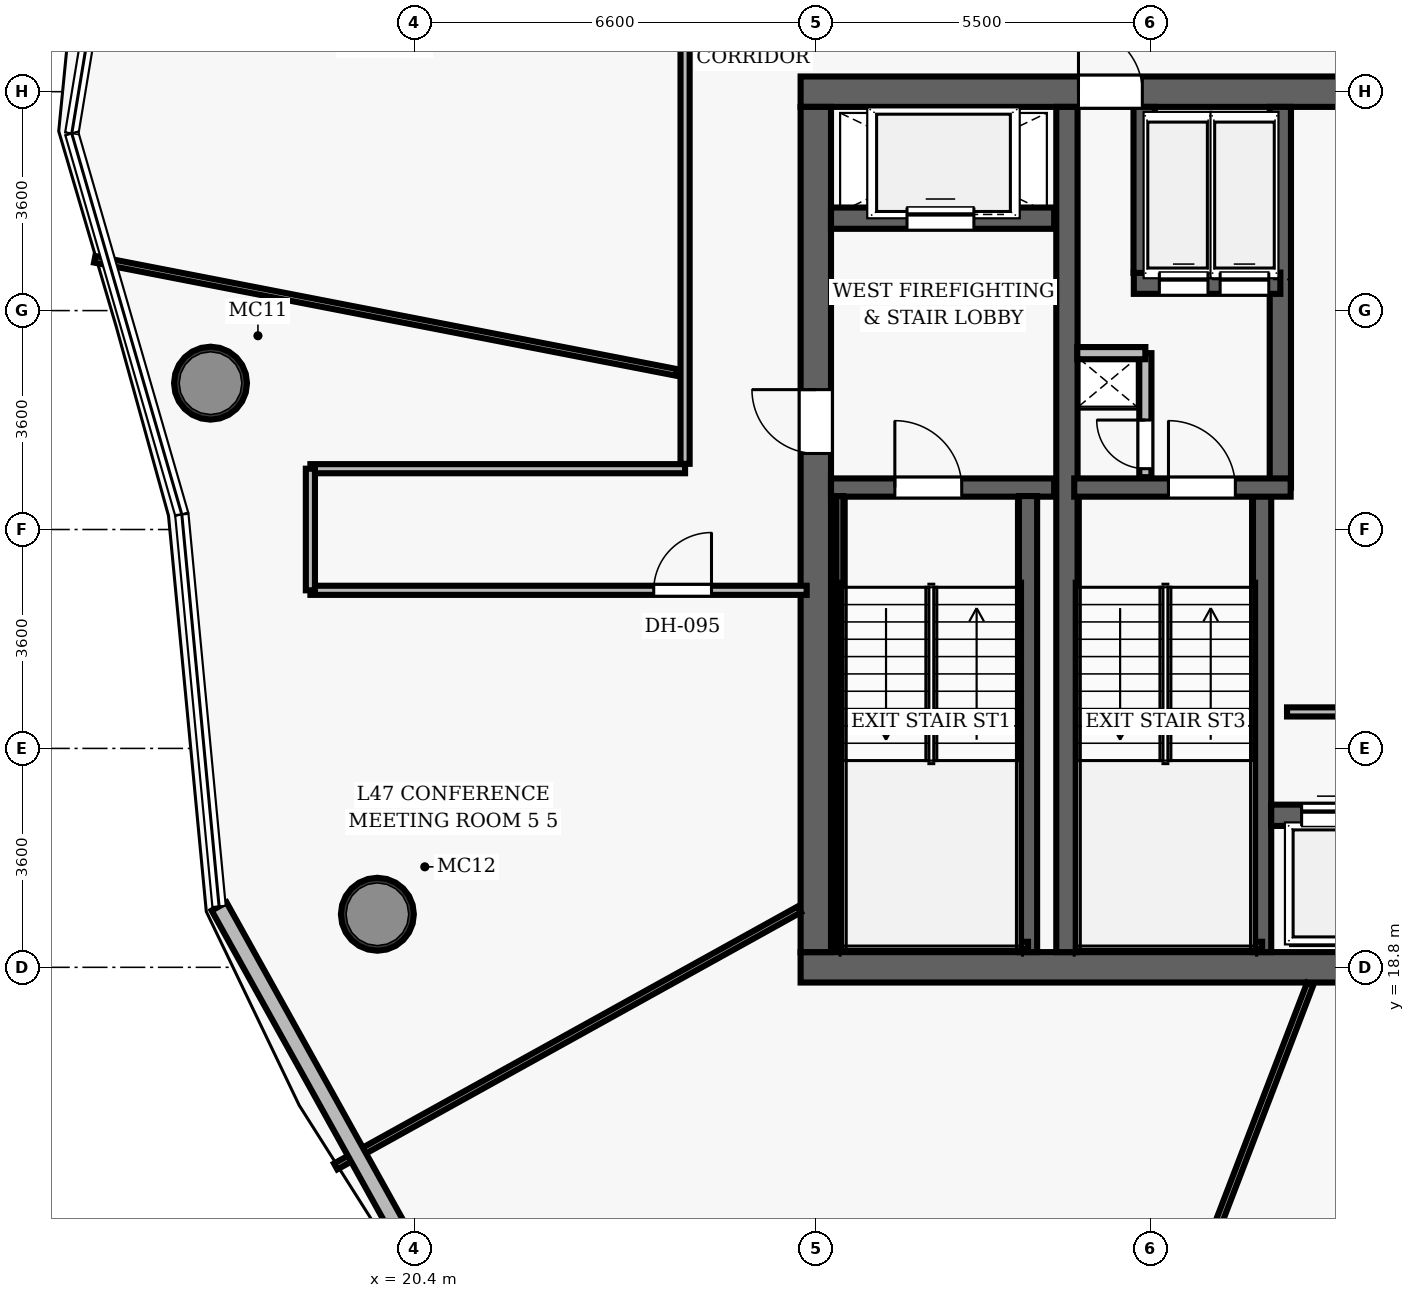
"""IFC4 building model, lengths in metres.
Left out: names, types, materials, properties, quantities, classifications, styles, units other than length and angle.
Written with IfcOpenShell. Run it as: python <this file> out.ifc"""

import sys

from ifc_helpers import new_model, si_unit, direction, frame, frame_2d, origin, origin_2d, place, context, subcontext, project, spatial, rectangle, hollow_circle, extrude, element, fill, save


model = new_model("IFC4")
c1 = context("Model", 3, precision=1e-05, world=origin(), true_north=direction((0.0, 1.0)))
c2 = subcontext(c1, "Body", "Model", "MODEL_VIEW")
j1 = project(units=[si_unit("LENGTHUNIT", "METRE"), si_unit("PLANEANGLEUNIT", "RADIAN")], contexts=[c1])
p1 = place(None, origin())
s1 = spatial("IfcSite", under=j1, at=p1, CompositionType="ELEMENT")
p2 = place(p1, origin())
s2 = spatial("IfcBuilding", under=s1, at=p2, CompositionType="ELEMENT")
p3 = place(p2, frame((0.0, 0.0, 186.6)))
s3 = spatial("IfcBuildingStorey", under=s2, at=p3, CompositionType="ELEMENT", Elevation=186.6)
p4 = place(p3, frame((26.75, 18.8, 0.0), z_axis=(0.0, 0.0, 1.0), x_axis=(1.0, 0.0, 0.0)))
e1 = element("IfcWall", 1, at=p4, inside=s3, PredefinedType="SHEAR", context=c2, shape_type="SweptSolid", body=[
    extrude(rectangle(XDim=22.5, YDim=0.5, at=frame_2d((11.25, 0.0))), origin(), (0.0, 0.0, 1.0), 3.85),
])
p5 = place(p4, frame((14.47, 0.0, 0.0)))
e2 = element("IfcOpeningElement", 2, at=p5, cuts=e1, PredefinedType="OPENING", context=c2, shape_type="SweptSolid", body=[
    extrude(rectangle(XDim=1.05, YDim=2.15, at=frame_2d((0.525, 1.075))), frame((0.0, 0.26, 0.0), z_axis=(0.0, -1.0, 0.0), x_axis=(1.0, 0.0, 0.0)), (0.0, 0.0, 1.0), 0.52),
])
p6 = place(p3, frame((26.75, 33.2, 0.0), z_axis=(0.0, 0.0, 1.0), x_axis=(1.0, 0.0, 0.0)))
e3 = element("IfcWall", 3, at=p6, inside=s3, PredefinedType="SHEAR", context=c2, shape_type="SweptSolid", body=[
    extrude(rectangle(XDim=22.5, YDim=0.5, at=frame_2d((11.25, 0.0))), origin(), (0.0, 0.0, 1.0), 3.85),
])
p7 = place(p6, frame((4.57, 0.0, 0.0)))
e4 = element("IfcOpeningElement", 4, at=p7, cuts=e3, PredefinedType="OPENING", context=c2, shape_type="SweptSolid", body=[
    extrude(rectangle(XDim=1.05, YDim=2.15, at=frame_2d((0.525, 1.075))), frame((0.0, 0.26, 0.0), z_axis=(0.0, -1.0, 0.0), x_axis=(1.0, 0.0, 0.0)), (0.0, 0.0, 1.0), 0.52),
])
p8 = place(p6, frame((14.47, 0.0, 0.0)))
e5 = element("IfcOpeningElement", 5, at=p8, cuts=e3, PredefinedType="OPENING", context=c2, shape_type="SweptSolid", body=[
    extrude(rectangle(XDim=1.05, YDim=2.15, at=frame_2d((0.525, 1.075))), frame((0.0, 0.26, 0.0), z_axis=(0.0, -1.0, 0.0), x_axis=(1.0, 0.0, 0.0)), (0.0, 0.0, 1.0), 0.52),
])
p9 = place(p3, frame((27.0, 19.05, 0.0), z_axis=(0.0, 0.0, 1.0), x_axis=(0.0, 1.0, 0.0)))
e6 = element("IfcWall", 6, at=p9, inside=s3, PredefinedType="SHEAR", context=c2, shape_type="SweptSolid", body=[
    extrude(rectangle(XDim=13.9, YDim=0.5, at=frame_2d((6.95, 0.0))), origin(), (0.0, 0.0, 1.0), 3.85),
])
p10 = place(p9, frame((8.2, 0.0, 0.0)))
e7 = element("IfcOpeningElement", 7, at=p10, cuts=e6, PredefinedType="OPENING", context=c2, shape_type="SweptSolid", body=[
    extrude(rectangle(XDim=1.05, YDim=2.15, at=frame_2d((0.525, 1.075))), frame((0.0, 0.26, 0.0), z_axis=(0.0, -1.0, 0.0), x_axis=(1.0, 0.0, 0.0)), (0.0, 0.0, 1.0), 0.52),
])
p11 = place(p3, frame((31.13, 19.05, 0.0), z_axis=(0.0, 0.0, 1.0), x_axis=(0.0, 1.0, 0.0)))
e8 = element("IfcWall", 8, at=p11, inside=s3, PredefinedType="SHEAR", context=c2, shape_type="SweptSolid", body=[
    extrude(rectangle(XDim=13.9, YDim=0.35, at=frame_2d((6.95, 0.0))), origin(), (0.0, 0.0, 1.0), 3.85),
])
for number, where, z_axis, x_axis in (
    (9, (17.045, 28.406, 0.0), (0.0, 0.0, 1.0), (1.0, 0.0, 0.0)),
    (10, (19.79, 19.673, 0.0), (0.0, 0.0, 1.0), (1.0, 0.0, 0.0)),
):
    element("IfcColumn", number, at=place(p3, frame(where, z_axis=z_axis, x_axis=x_axis)), inside=s3, PredefinedType="COLUMN", context=c2, shape_type="SweptSolid", body=[
        extrude(hollow_circle(Radius=0.6, WallThickness=0.05, at=origin_2d()), origin(), (0.0, 0.0, 1.0), 3.85),
    ])
p12 = place(p3, frame((27.25, 26.69, 0.0), z_axis=(0.0, 0.0, 1.0), x_axis=(1.0, 0.0, 0.0)))
e11 = element("IfcWall", 11, at=p12, inside=s3, PredefinedType="SHEAR", context=c2, shape_type="SweptSolid", body=[
    extrude(rectangle(XDim=3.67, YDim=0.3, at=frame_2d((1.835, 0.0))), origin(), (0.0, 0.0, 1.0), 3.85),
])
p13 = place(p12, frame((1.05, 0.0, 0.0)))
e12 = element("IfcOpeningElement", 12, at=p13, cuts=e11, PredefinedType="OPENING", context=c2, shape_type="SweptSolid", body=[
    extrude(rectangle(XDim=1.1, YDim=2.15, at=frame_2d((0.55, 1.075))), frame((0.0, 0.16, 0.0), z_axis=(0.0, -1.0, 0.0), x_axis=(1.0, 0.0, 0.0)), (0.0, 0.0, 1.0), 0.32),
])
p14 = place(p3, frame((30.49, 19.05, 0.0), z_axis=(0.0, 0.0, 1.0), x_axis=(0.0, 1.0, 0.0)))
e13 = element("IfcWall", 13, at=p14, inside=s3, PredefinedType="SHEAR", context=c2, shape_type="SweptSolid", body=[
    extrude(rectangle(XDim=7.5, YDim=0.3, at=frame_2d((3.75, 0.0))), origin(), (0.0, 0.0, 1.0), 3.85),
])
p15 = place(p3, frame((27.395, 19.1, 0.0), z_axis=(0.0, 0.0, 1.0), x_axis=(0.0, 1.0, 0.0)))
e14 = element("IfcWall", 14, at=p15, inside=s3, PredefinedType="SHEAR", context=c2, shape_type="SweptSolid", body=[
    extrude(rectangle(XDim=7.45, YDim=0.12, at=frame_2d((3.725, 0.0))), origin(), (0.0, 0.0, 1.0), 3.85),
])
p16 = place(p3, frame((27.395, 19.16, 0.0), z_axis=(0.0, 0.0, 1.0), x_axis=(1.0, 0.0, 0.0)))
e15 = element("IfcWall", 15, at=p16, inside=s3, PredefinedType="SHEAR", context=c2, shape_type="SweptSolid", body=[
    extrude(rectangle(XDim=3.095, YDim=0.12, at=frame_2d((1.547, 0.0))), origin(), (0.0, 0.0, 1.0), 3.85),
])
p17 = place(p3, frame((27.25, 31.12, 0.0), z_axis=(0.0, 0.0, 1.0), x_axis=(1.0, 0.0, 0.0)))
e16 = element("IfcWall", 16, at=p17, inside=s3, PredefinedType="SHEAR", context=c2, shape_type="SweptSolid", body=[
    extrude(rectangle(XDim=3.67, YDim=0.35, at=frame_2d((1.835, 0.0))), origin(), (0.0, 0.0, 1.0), 3.035),
])
p18 = place(p17, frame((1.25, 0.0, 0.0)))
e17 = element("IfcOpeningElement", 17, at=p18, cuts=e16, PredefinedType="OPENING", context=c2, shape_type="SweptSolid", body=[
    extrude(rectangle(XDim=1.1, YDim=2.15, at=frame_2d((0.55, 1.075))), frame((0.0, 0.185, 0.0), z_axis=(0.0, -1.0, 0.0), x_axis=(1.0, 0.0, 0.0)), (0.0, 0.0, 1.0), 0.37),
])
p19 = place(p3, frame((34.34, 19.05, 0.0), z_axis=(0.0, 0.0, 1.0), x_axis=(0.0, 1.0, 0.0)))
e18 = element("IfcWall", 18, at=p19, inside=s3, PredefinedType="SHEAR", context=c2, shape_type="SweptSolid", body=[
    extrude(rectangle(XDim=7.5, YDim=0.3, at=frame_2d((3.75, 0.0))), origin(), (0.0, 0.0, 1.0), 3.85),
])
p20 = place(p3, frame((34.64, 26.69, 0.0), z_axis=(0.0, 0.0, 1.0), x_axis=(0.0, 1.0, 0.0)))
e19 = element("IfcWall", 19, at=p20, inside=s3, PredefinedType="SHEAR", context=c2, shape_type="SweptSolid", body=[
    extrude(rectangle(XDim=6.26, YDim=0.35, at=frame_2d((3.13, 0.0))), origin(), (0.0, 0.0, 1.0), 3.85),
])
p21 = place(p3, frame((31.25, 26.69, 0.0), z_axis=(0.0, 0.0, 1.0), x_axis=(1.0, 0.0, 0.0)))
e20 = element("IfcWall", 20, at=p21, inside=s3, PredefinedType="SHEAR", context=c2, shape_type="SweptSolid", body=[
    extrude(rectangle(XDim=3.56, YDim=0.3, at=frame_2d((1.78, 0.0))), origin(), (0.0, 0.0, 1.0), 3.85),
])
p22 = place(p21, frame((1.55, 0.0, 0.0)))
e21 = element("IfcOpeningElement", 21, at=p22, cuts=e20, PredefinedType="OPENING", context=c2, shape_type="SweptSolid", body=[
    extrude(rectangle(XDim=1.1, YDim=2.15, at=frame_2d((0.55, 1.075))), frame((0.0, 0.16, 0.0), z_axis=(0.0, -1.0, 0.0), x_axis=(1.0, 0.0, 0.0)), (0.0, 0.0, 1.0), 0.32),
])
p23 = place(p3, frame((31.3, 19.16, 0.0), z_axis=(0.0, 0.0, 1.0), x_axis=(1.0, 0.0, 0.0)))
e22 = element("IfcWall", 22, at=p23, inside=s3, PredefinedType="SHEAR", context=c2, shape_type="SweptSolid", body=[
    extrude(rectangle(XDim=3.04, YDim=0.12, at=frame_2d((1.52, 0.0))), origin(), (0.0, 0.0, 1.0), 3.85),
])
p24 = place(p3, frame((32.23, 30.05, 0.0), z_axis=(0.0, 0.0, 1.0), x_axis=(1.0, 0.0, 0.0)))
e23 = element("IfcWall", 23, at=p24, inside=s3, PredefinedType="SHEAR", context=c2, shape_type="SweptSolid", body=[
    extrude(rectangle(XDim=2.41, YDim=0.35, at=frame_2d((1.205, 0.0))), origin(), (0.0, 0.0, 1.0), 3.035),
])
p25 = place(p24, frame((0.42, 0.0, 0.0)))
e24 = element("IfcOpeningElement", 24, at=p25, cuts=e23, PredefinedType="OPENING", context=c2, shape_type="SweptSolid", body=[
    extrude(rectangle(XDim=0.8, YDim=2.15, at=frame_2d((0.4, 1.075))), frame((0.0, 0.185, 0.0), z_axis=(0.0, -1.0, 0.0), x_axis=(1.0, 0.0, 0.0)), (0.0, 0.0, 1.0), 0.37),
])
p26 = place(p24, frame((1.42, 0.0, 0.0)))
e25 = element("IfcOpeningElement", 25, at=p26, cuts=e23, PredefinedType="OPENING", context=c2, shape_type="SweptSolid", body=[
    extrude(rectangle(XDim=0.8, YDim=2.15, at=frame_2d((0.4, 1.075))), frame((0.0, 0.185, 0.0), z_axis=(0.0, -1.0, 0.0), x_axis=(1.0, 0.0, 0.0)), (0.0, 0.0, 1.0), 0.37),
])
p27 = place(p3, frame((32.4, 30.22, 0.0), z_axis=(0.0, 0.0, 1.0), x_axis=(0.0, 1.0, 0.0)))
e26 = element("IfcWall", 26, at=p27, inside=s3, PredefinedType="SHEAR", context=c2, shape_type="SweptSolid", body=[
    extrude(rectangle(XDim=2.73, YDim=0.35, at=frame_2d((1.365, 0.0))), origin(), (0.0, 0.0, 1.0), 3.035),
])
p28 = place(p3, frame((32.42, 26.86, 0.0), z_axis=(0.0, 0.0, 1.0), x_axis=(0.0, 1.0, 0.0)))
e27 = element("IfcWall", 27, at=p28, inside=s3, PredefinedType="PARTITIONING", context=c2, shape_type="SweptSolid", body=[
    extrude(rectangle(XDim=2.04, YDim=0.2, at=frame_2d((1.02, 0.0))), origin(), (0.0, 0.0, 1.0), 3.035),
])
p29 = place(p28, frame((0.14, 0.0, 0.0)))
e28 = element("IfcOpeningElement", 28, at=p29, cuts=e27, PredefinedType="OPENING", context=c2, shape_type="SweptSolid", body=[
    extrude(rectangle(XDim=0.8, YDim=2.05, at=frame_2d((0.4, 1.025))), frame((0.0, 0.11, 0.0), z_axis=(0.0, -1.0, 0.0), x_axis=(1.0, 0.0, 0.0)), (0.0, 0.0, 1.0), 0.22),
])
p30 = place(p3, frame((31.3, 28.9, 0.0), z_axis=(0.0, 0.0, 1.0), x_axis=(1.0, 0.0, 0.0)))
e29 = element("IfcWall", 29, at=p30, inside=s3, PredefinedType="PARTITIONING", context=c2, shape_type="SweptSolid", body=[
    extrude(rectangle(XDim=1.12, YDim=0.2, at=frame_2d((0.56, 0.0))), origin(), (0.0, 0.0, 1.0), 3.035),
])
p31 = place(p3, frame((34.49, 21.3, 0.0), z_axis=(0.0, 0.0, 1.0), x_axis=(1.0, 0.0, 0.0)))
e30 = element("IfcWall", 30, at=p31, inside=s3, PredefinedType="SHEAR", context=c2, shape_type="SweptSolid", body=[
    extrude(rectangle(XDim=6.68, YDim=0.35, at=frame_2d((3.34, 0.0))), origin(), (0.0, 0.0, 1.0), 3.035),
])
p32 = place(p31, frame((0.5, 0.0, 0.0)))
e31 = element("IfcOpeningElement", 31, at=p32, cuts=e30, PredefinedType="OPENING", context=c2, shape_type="SweptSolid", body=[
    extrude(rectangle(XDim=0.9, YDim=2.15, at=frame_2d((0.45, 1.075))), frame((0.0, 0.185, 0.0), z_axis=(0.0, -1.0, 0.0), x_axis=(1.0, 0.0, 0.0)), (0.0, 0.0, 1.0), 0.37),
])
p33 = place(p31, frame((2.58, 0.0, 0.0)))
e32 = element("IfcOpeningElement", 32, at=p33, cuts=e30, PredefinedType="OPENING", context=c2, shape_type="SweptSolid", body=[
    extrude(rectangle(XDim=0.9, YDim=2.15, at=frame_2d((0.45, 1.075))), frame((0.0, 0.185, 0.0), z_axis=(0.0, -1.0, 0.0), x_axis=(1.0, 0.0, 0.0)), (0.0, 0.0, 1.0), 0.37),
])
p34 = place(p31, frame((4.66, 0.0, 0.0)))
e33 = element("IfcOpeningElement", 33, at=p34, cuts=e30, PredefinedType="OPENING", context=c2, shape_type="SweptSolid", body=[
    extrude(rectangle(XDim=0.9, YDim=2.15, at=frame_2d((0.45, 1.075))), frame((0.0, 0.185, 0.0), z_axis=(0.0, -1.0, 0.0), x_axis=(1.0, 0.0, 0.0)), (0.0, 0.0, 1.0), 0.37),
])
p35 = place(p3, frame((34.75, 23.0, 0.0), z_axis=(0.0, 0.0, 1.0), x_axis=(1.0, 0.0, 0.0)))
e34 = element("IfcWall", 34, at=p35, inside=s3, PredefinedType="PARTITIONING", context=c2, shape_type="SweptSolid", body=[
    extrude(rectangle(XDim=6.25, YDim=0.15, at=frame_2d((3.125, 0.0))), origin(), (0.0, 0.0, 1.0), 3.035),
])
p36 = place(p3, frame((24.85, 27.08, 0.0), z_axis=(0.0, 0.0, 1.0), x_axis=(0.0, 1.0, 0.0)))
e35 = element("IfcWall", 35, at=p36, inside=s3, PredefinedType="PARTITIONING", context=c2, shape_type="SweptSolid", body=[
    extrude(rectangle(XDim=8.12, YDim=0.15, at=frame_2d((4.06, 0.0))), origin(), (0.0, 0.0, 1.0), 3.035),
])
p37 = place(p3, frame((18.688, 27.0, 0.0), z_axis=(0.0, 0.0, 1.0), x_axis=(1.0, 0.0, 0.0)))
e36 = element("IfcWall", 36, at=p37, inside=s3, PredefinedType="PARTITIONING", context=c2, shape_type="SweptSolid", body=[
    extrude(rectangle(XDim=6.162, YDim=0.15, at=frame_2d((3.081, 0.0))), origin(), (0.0, 0.0, 1.0), 3.035),
])
p38 = place(p3, frame((18.688, 25.0, 0.0), z_axis=(0.0, 0.0, 1.0), x_axis=(1.0, 0.0, 0.0)))
e37 = element("IfcWall", 37, at=p38, inside=s3, PredefinedType="PARTITIONING", context=c2, shape_type="SweptSolid", body=[
    extrude(rectangle(XDim=8.162, YDim=0.15, at=frame_2d((4.081, 0.0))), origin(), (0.0, 0.0, 1.0), 3.035),
])
p39 = place(p38, frame((5.646, 0.0, 0.0)))
e38 = element("IfcOpeningElement", 38, at=p39, cuts=e37, PredefinedType="OPENING", context=c2, shape_type="SweptSolid", body=[
    extrude(rectangle(XDim=0.95, YDim=2.15, at=frame_2d((0.475, 1.075))), frame((0.0, 0.085, 0.0), z_axis=(0.0, -1.0, 0.0), x_axis=(1.0, 0.0, 0.0)), (0.0, 0.0, 1.0), 0.17),
])
p40 = place(p3, frame((18.688, 25.0, 0.0), z_axis=(0.0, 0.0, 1.0), x_axis=(0.0, 1.0, 0.0)))
e39 = element("IfcWall", 39, at=p40, inside=s3, PredefinedType="PARTITIONING", context=c2, shape_type="SweptSolid", body=[
    extrude(rectangle(XDim=2.0, YDim=0.15, at=frame_2d((1.0, 0.0))), origin(), (0.0, 0.0, 1.0), 3.035),
])
p41 = place(p3, frame((24.71, 28.583, 0.0), z_axis=(0.0, 0.0, 1.0), x_axis=(-0.981624902582, 0.190820729041, 0.0)))
e40 = element("IfcWall", 40, at=p41, inside=s3, PredefinedType="PARTITIONING", context=c2, shape_type="SweptSolid", body=[
    extrude(rectangle(XDim=9.749, YDim=0.11, at=frame_2d((4.875, 0.0))), origin(), (0.0, 0.0, 1.0), 3.035),
])
p42 = place(p3, frame((26.73, 19.753, 0.0), z_axis=(0.0, 0.0, 1.0), x_axis=(-0.874613844083, -0.484820197329, 0.0)))
e41 = element("IfcWall", 41, at=p42, inside=s3, PredefinedType="PARTITIONING", context=c2, shape_type="SweptSolid", body=[
    extrude(rectangle(XDim=8.72, YDim=0.11, at=frame_2d((4.36, 0.0))), origin(), (0.0, 0.0, 1.0), 3.035),
])
p43 = place(p3, frame((35.133, 18.53, 0.0), z_axis=(0.0, 0.0, 1.0), x_axis=(-0.358378051457, -0.933576548674, 0.0)))
e42 = element("IfcWall", 42, at=p43, inside=s3, PredefinedType="PARTITIONING", context=c2, shape_type="SweptSolid", body=[
    extrude(rectangle(XDim=14.156, YDim=0.11, at=frame_2d((7.078, 0.0))), origin(), (0.0, 0.0, 1.0), 3.035),
])
p44 = place(p3, frame((20.595, 13.667, 0.0), z_axis=(0.0, 0.0, 1.0), x_axis=(-0.485725635205, 0.87411132432, 0.0)))
e43 = element("IfcWall", 43, at=p44, inside=s3, PredefinedType="SOLIDWALL", context=c2, shape_type="SweptSolid", body=[
    extrude(rectangle(XDim=7.018, YDim=0.28, at=frame_2d((3.509, 0.0))), origin(), (0.0, 0.0, 1.0), 3.62),
])
p45 = place(p13, origin())
e44 = element("IfcDoor", 44, at=p45, inside=s3, OperationType="SINGLE_SWING_LEFT", PredefinedType="DOOR", context=c2, shape_type="SweptSolid", body=[
    extrude(rectangle(XDim=1.1, YDim=2.15, at=frame_2d((0.55, 1.075))), frame((0.0, 0.025, 0.0), z_axis=(0.0, -1.0, 0.0), x_axis=(1.0, 0.0, 0.0)), (0.0, 0.0, 1.0), 0.05),
])
fill(e12, e44)
p46 = place(p10, origin())
e45 = element("IfcDoor", 45, at=p46, inside=s3, OperationType="SINGLE_SWING_RIGHT", PredefinedType="DOOR", context=c2, shape_type="SweptSolid", body=[
    extrude(rectangle(XDim=1.05, YDim=2.15, at=frame_2d((0.525, 1.075))), frame((0.0, 0.025, 0.0), z_axis=(0.0, -1.0, 0.0), x_axis=(1.0, 0.0, 0.0)), (0.0, 0.0, 1.0), 0.05),
])
fill(e7, e45)
p47 = place(p22, origin())
e46 = element("IfcDoor", 46, at=p47, inside=s3, OperationType="SINGLE_SWING_LEFT", PredefinedType="DOOR", context=c2, shape_type="SweptSolid", body=[
    extrude(rectangle(XDim=1.1, YDim=2.15, at=frame_2d((0.55, 1.075))), frame((0.0, 0.025, 0.0), z_axis=(0.0, -1.0, 0.0), x_axis=(1.0, 0.0, 0.0)), (0.0, 0.0, 1.0), 0.05),
])
fill(e21, e46)
p48 = place(p29, origin())
e47 = element("IfcDoor", 47, at=p48, inside=s3, OperationType="SINGLE_SWING_RIGHT", PredefinedType="DOOR", context=c2, shape_type="SweptSolid", body=[
    extrude(rectangle(XDim=0.8, YDim=2.05, at=frame_2d((0.4, 1.025))), frame((0.0, 0.025, 0.0), z_axis=(0.0, -1.0, 0.0), x_axis=(1.0, 0.0, 0.0)), (0.0, 0.0, 1.0), 0.05),
])
fill(e28, e47)
p49 = place(p7, origin())
e48 = element("IfcDoor", 48, at=p49, inside=s3, OperationType="SINGLE_SWING_LEFT", PredefinedType="DOOR", context=c2, shape_type="SweptSolid", body=[
    extrude(rectangle(XDim=1.05, YDim=2.15, at=frame_2d((0.525, 1.075))), frame((0.0, 0.025, 0.0), z_axis=(0.0, -1.0, 0.0), x_axis=(1.0, 0.0, 0.0)), (0.0, 0.0, 1.0), 0.05),
])
fill(e4, e48)
p50 = place(p39, origin())
e49 = element("IfcDoor", 49, at=p50, inside=s3, OperationType="SINGLE_SWING_RIGHT", PredefinedType="DOOR", context=c2, shape_type="SweptSolid", body=[
    extrude(rectangle(XDim=0.95, YDim=2.15, at=frame_2d((0.475, 1.075))), frame((0.0, 0.025, 0.0), z_axis=(0.0, -1.0, 0.0), x_axis=(1.0, 0.0, 0.0)), (0.0, 0.0, 1.0), 0.05),
])
fill(e38, e49)
p51 = place(p32, origin())
e50 = element("IfcDoor", 50, at=p51, inside=s3, OperationType="SLIDING_TO_LEFT", PredefinedType="DOOR", context=c2, shape_type="SweptSolid", body=[
    extrude(rectangle(XDim=0.9, YDim=2.15, at=frame_2d((0.45, 1.075))), frame((0.0, 0.025, 0.0), z_axis=(0.0, -1.0, 0.0), x_axis=(1.0, 0.0, 0.0)), (0.0, 0.0, 1.0), 0.05),
])
fill(e31, e50)
p52 = place(p18, origin())
e51 = element("IfcDoor", 51, at=p52, inside=s3, OperationType="SLIDING_TO_LEFT", PredefinedType="DOOR", context=c2, shape_type="SweptSolid", body=[
    extrude(rectangle(XDim=1.1, YDim=2.15, at=frame_2d((0.55, 1.075))), frame((0.0, 0.025, 0.0), z_axis=(0.0, -1.0, 0.0), x_axis=(1.0, 0.0, 0.0)), (0.0, 0.0, 1.0), 0.05),
])
fill(e17, e51)
p53 = place(p25, origin())
e52 = element("IfcDoor", 52, at=p53, inside=s3, OperationType="SLIDING_TO_LEFT", PredefinedType="DOOR", context=c2, shape_type="SweptSolid", body=[
    extrude(rectangle(XDim=0.8, YDim=2.15, at=frame_2d((0.4, 1.075))), frame((0.0, 0.025, 0.0), z_axis=(0.0, -1.0, 0.0), x_axis=(1.0, 0.0, 0.0)), (0.0, 0.0, 1.0), 0.05),
])
fill(e24, e52)
p54 = place(p26, origin())
e53 = element("IfcDoor", 53, at=p54, inside=s3, OperationType="SLIDING_TO_LEFT", PredefinedType="DOOR", context=c2, shape_type="SweptSolid", body=[
    extrude(rectangle(XDim=0.8, YDim=2.15, at=frame_2d((0.4, 1.075))), frame((0.0, 0.025, 0.0), z_axis=(0.0, -1.0, 0.0), x_axis=(1.0, 0.0, 0.0)), (0.0, 0.0, 1.0), 0.05),
])
fill(e25, e53)
save(model, sys.argv[1])
